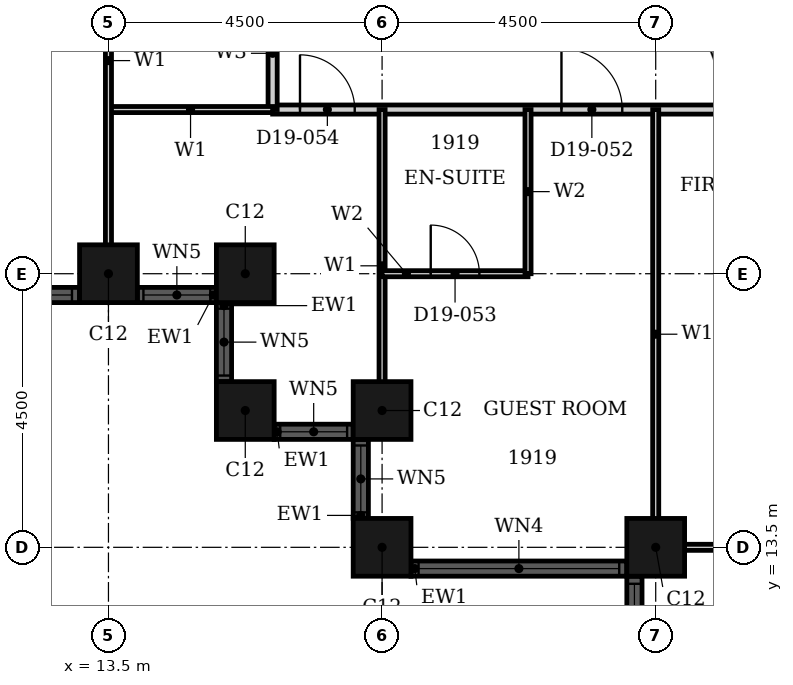
"""IFC4 building model, lengths in metres.
Left out: names, types, materials, properties, quantities, classifications, styles, units other than length and angle.
Written with IfcOpenShell. Run it as: python <this file> out.ifc"""

import sys

from ifc_helpers import new_model, si_unit, direction, frame, frame_2d, origin, origin_2d, place, context, subcontext, project, spatial, rectangle, hollow_rectangle, extrude, element, fill, save


model = new_model("IFC4")
c1 = context("Model", 3, precision=1e-05, world=origin(), true_north=direction((0.0, 1.0)))
c2 = subcontext(c1, "Body", "Model", "MODEL_VIEW")
j1 = project(units=[si_unit("LENGTHUNIT", "METRE"), si_unit("PLANEANGLEUNIT", "RADIAN")], contexts=[c1])
p1 = place(None, origin())
s1 = spatial("IfcSite", under=j1, at=p1, CompositionType="ELEMENT")
p2 = place(p1, origin())
s2 = spatial("IfcBuilding", under=s1, at=p2, CompositionType="ELEMENT")
p3 = place(p2, frame((0.0, 0.0, 81.6)))
s3 = spatial("IfcBuildingStorey", under=s2, at=p3, CompositionType="ELEMENT", Elevation=81.6)
for number, where, z_axis, x_axis in (
    (1, (13.5, 18.0, 0.0), (0.0, 0.0, 1.0), (1.0, 0.0, 0.0)),
    (2, (15.75, 18.0, 0.0), (0.0, 0.0, 1.0), (1.0, 0.0, 0.0)),
    (3, (15.75, 15.75, 0.0), (0.0, 0.0, 1.0), (1.0, 0.0, 0.0)),
    (4, (18.0, 15.75, 0.0), (0.0, 0.0, 1.0), (1.0, 0.0, 0.0)),
    (5, (18.0, 13.5, 0.0), (0.0, 0.0, 1.0), (1.0, 0.0, 0.0)),
    (6, (22.5, 13.5, 0.0), (0.0, 0.0, 1.0), (1.0, 0.0, 0.0)),
):
    element("IfcColumn", number, at=place(p3, frame(where, z_axis=z_axis, x_axis=x_axis)), inside=s3, PredefinedType="COLUMN", context=c2, shape_type="SweptSolid", body=[
        extrude(hollow_rectangle(XDim=0.95, YDim=0.95, WallThickness=0.03, at=origin_2d()), origin(), (0.0, 0.0, 1.0), 3.6),
    ])
p4 = place(p3, frame((4.975, 17.65, 0.0), z_axis=(0.0, 0.0, 1.0), x_axis=(1.0, 0.0, 0.0)))
e7 = element("IfcWall", 7, at=p4, inside=s3, PredefinedType="SOLIDWALL", context=c2, shape_type="SweptSolid", body=[
    extrude(rectangle(XDim=8.05, YDim=0.25, at=frame_2d((4.025, 0.0))), origin(), (0.0, 0.0, 1.0), 3.6),
])
p5 = place(p4, frame((0.125, 0.0, 0.9)))
e8 = element("IfcOpeningElement", 8, at=p5, cuts=e7, PredefinedType="OPENING", context=c2, shape_type="SweptSolid", body=[
    extrude(rectangle(XDim=3.3, YDim=2.08, at=frame_2d((1.65, 1.04))), frame((0.0, 0.135, 0.0), z_axis=(0.0, -1.0, 0.0), x_axis=(1.0, 0.0, 0.0)), (0.0, 0.0, 1.0), 0.27),
])
p6 = place(p4, frame((4.625, 0.0, 0.9)))
e9 = element("IfcOpeningElement", 9, at=p6, cuts=e7, PredefinedType="OPENING", context=c2, shape_type="SweptSolid", body=[
    extrude(rectangle(XDim=3.3, YDim=2.08, at=frame_2d((1.65, 1.04))), frame((0.0, 0.135, 0.0), z_axis=(0.0, -1.0, 0.0), x_axis=(1.0, 0.0, 0.0)), (0.0, 0.0, 1.0), 0.27),
])
p7 = place(p3, frame((13.975, 17.65, 0.0), z_axis=(0.0, 0.0, 1.0), x_axis=(1.0, 0.0, 0.0)))
e10 = element("IfcWall", 10, at=p7, inside=s3, PredefinedType="SOLIDWALL", context=c2, shape_type="SweptSolid", body=[
    extrude(rectangle(XDim=1.3, YDim=0.25, at=frame_2d((0.65, 0.0))), origin(), (0.0, 0.0, 1.0), 3.6),
])
p8 = place(p7, frame((0.1, 0.0, 0.9)))
e11 = element("IfcOpeningElement", 11, at=p8, cuts=e10, PredefinedType="OPENING", context=c2, shape_type="SweptSolid", body=[
    extrude(rectangle(XDim=1.1, YDim=2.08, at=frame_2d((0.55, 1.04))), frame((0.0, 0.135, 0.0), z_axis=(0.0, -1.0, 0.0), x_axis=(1.0, 0.0, 0.0)), (0.0, 0.0, 1.0), 0.27),
])
p9 = place(p3, frame((15.4, 17.525, 0.0), z_axis=(0.0, 0.0, 1.0), x_axis=(0.0, -1.0, 0.0)))
e12 = element("IfcWall", 12, at=p9, inside=s3, PredefinedType="SOLIDWALL", context=c2, shape_type="SweptSolid", body=[
    extrude(rectangle(XDim=1.3, YDim=0.25, at=frame_2d((0.65, 0.0))), origin(), (0.0, 0.0, 1.0), 3.6),
])
p10 = place(p9, frame((0.1, 0.0, 0.9)))
e13 = element("IfcOpeningElement", 13, at=p10, cuts=e12, PredefinedType="OPENING", context=c2, shape_type="SweptSolid", body=[
    extrude(rectangle(XDim=1.1, YDim=2.08, at=frame_2d((0.55, 1.04))), frame((0.0, 0.135, 0.0), z_axis=(0.0, -1.0, 0.0), x_axis=(1.0, 0.0, 0.0)), (0.0, 0.0, 1.0), 0.27),
])
p11 = place(p3, frame((16.225, 15.4, 0.0), z_axis=(0.0, 0.0, 1.0), x_axis=(1.0, 0.0, 0.0)))
e14 = element("IfcWall", 14, at=p11, inside=s3, PredefinedType="SOLIDWALL", context=c2, shape_type="SweptSolid", body=[
    extrude(rectangle(XDim=1.3, YDim=0.25, at=frame_2d((0.65, 0.0))), origin(), (0.0, 0.0, 1.0), 3.6),
])
p12 = place(p11, frame((0.1, 0.0, 0.9)))
e15 = element("IfcOpeningElement", 15, at=p12, cuts=e14, PredefinedType="OPENING", context=c2, shape_type="SweptSolid", body=[
    extrude(rectangle(XDim=1.1, YDim=2.08, at=frame_2d((0.55, 1.04))), frame((0.0, 0.135, 0.0), z_axis=(0.0, -1.0, 0.0), x_axis=(1.0, 0.0, 0.0)), (0.0, 0.0, 1.0), 0.27),
])
p13 = place(p3, frame((17.65, 15.275, 0.0), z_axis=(0.0, 0.0, 1.0), x_axis=(0.0, -1.0, 0.0)))
e16 = element("IfcWall", 16, at=p13, inside=s3, PredefinedType="SOLIDWALL", context=c2, shape_type="SweptSolid", body=[
    extrude(rectangle(XDim=1.3, YDim=0.25, at=frame_2d((0.65, 0.0))), origin(), (0.0, 0.0, 1.0), 3.6),
])
p14 = place(p13, frame((0.1, 0.0, 0.9)))
e17 = element("IfcOpeningElement", 17, at=p14, cuts=e16, PredefinedType="OPENING", context=c2, shape_type="SweptSolid", body=[
    extrude(rectangle(XDim=1.1, YDim=2.08, at=frame_2d((0.55, 1.04))), frame((0.0, 0.135, 0.0), z_axis=(0.0, -1.0, 0.0), x_axis=(1.0, 0.0, 0.0)), (0.0, 0.0, 1.0), 0.27),
])
p15 = place(p3, frame((18.475, 13.15, 0.0), z_axis=(0.0, 0.0, 1.0), x_axis=(1.0, 0.0, 0.0)))
e18 = element("IfcWall", 18, at=p15, inside=s3, PredefinedType="SOLIDWALL", context=c2, shape_type="SweptSolid", body=[
    extrude(rectangle(XDim=3.55, YDim=0.25, at=frame_2d((1.775, 0.0))), origin(), (0.0, 0.0, 1.0), 3.6),
])
p16 = place(p15, frame((0.125, 0.0, 0.9)))
e19 = element("IfcOpeningElement", 19, at=p16, cuts=e18, PredefinedType="OPENING", context=c2, shape_type="SweptSolid", body=[
    extrude(rectangle(XDim=3.3, YDim=2.08, at=frame_2d((1.65, 1.04))), frame((0.0, 0.135, 0.0), z_axis=(0.0, -1.0, 0.0), x_axis=(1.0, 0.0, 0.0)), (0.0, 0.0, 1.0), 0.27),
])
p17 = place(p3, frame((22.15, 13.025, 0.0), z_axis=(0.0, 0.0, 1.0), x_axis=(0.0, -1.0, 0.0)))
e20 = element("IfcWall", 20, at=p17, inside=s3, PredefinedType="SOLIDWALL", context=c2, shape_type="SweptSolid", body=[
    extrude(rectangle(XDim=8.05, YDim=0.25, at=frame_2d((4.025, 0.0))), origin(), (0.0, 0.0, 1.0), 3.6),
])
p18 = place(p17, frame((0.125, 0.0, 0.9)))
e21 = element("IfcOpeningElement", 21, at=p18, cuts=e20, PredefinedType="OPENING", context=c2, shape_type="SweptSolid", body=[
    extrude(rectangle(XDim=3.3, YDim=2.08, at=frame_2d((1.65, 1.04))), frame((0.0, 0.135, 0.0), z_axis=(0.0, -1.0, 0.0), x_axis=(1.0, 0.0, 0.0)), (0.0, 0.0, 1.0), 0.27),
])
p19 = place(p17, frame((4.625, 0.0, 0.9)))
e22 = element("IfcOpeningElement", 22, at=p19, cuts=e20, PredefinedType="OPENING", context=c2, shape_type="SweptSolid", body=[
    extrude(rectangle(XDim=3.3, YDim=2.08, at=frame_2d((1.65, 1.04))), frame((0.0, 0.135, 0.0), z_axis=(0.0, -1.0, 0.0), x_axis=(1.0, 0.0, 0.0)), (0.0, 0.0, 1.0), 0.27),
])
p20 = place(p3, frame((16.2, 20.7, 0.0), z_axis=(0.0, 0.0, 1.0), x_axis=(1.0, 0.0, 0.0)))
e23 = element("IfcWall", 23, at=p20, inside=s3, PredefinedType="PARTITIONING", context=c2, shape_type="SweptSolid", body=[
    extrude(rectangle(XDim=13.5, YDim=0.15, at=frame_2d((6.75, 0.0))), origin(), (0.0, 0.0, 1.0), 3.3),
])
p21 = place(p20, frame((4.75, 0.0, 0.0)))
e24 = element("IfcOpeningElement", 24, at=p21, cuts=e23, PredefinedType="OPENING", context=c2, shape_type="SweptSolid", body=[
    extrude(rectangle(XDim=1.0, YDim=2.1, at=frame_2d((0.5, 1.05))), frame((0.0, 0.085, 0.0), z_axis=(0.0, -1.0, 0.0), x_axis=(1.0, 0.0, 0.0)), (0.0, 0.0, 1.0), 0.17),
])
p22 = place(p20, frame((0.45, 0.0, 0.0)))
e25 = element("IfcOpeningElement", 25, at=p22, cuts=e23, PredefinedType="OPENING", context=c2, shape_type="SweptSolid", body=[
    extrude(rectangle(XDim=0.9, YDim=2.1, at=frame_2d((0.45, 1.05))), frame((0.0, 0.085, 0.0), z_axis=(0.0, -1.0, 0.0), x_axis=(1.0, 0.0, 0.0)), (0.0, 0.0, 1.0), 0.17),
])
p23 = place(p20, frame((9.45, 0.0, 0.0)))
e26 = element("IfcOpeningElement", 26, at=p23, cuts=e23, PredefinedType="OPENING", context=c2, shape_type="SweptSolid", body=[
    extrude(rectangle(XDim=0.9, YDim=2.1, at=frame_2d((0.45, 1.05))), frame((0.0, 0.085, 0.0), z_axis=(0.0, -1.0, 0.0), x_axis=(1.0, 0.0, 0.0)), (0.0, 0.0, 1.0), 0.17),
])
p24 = place(p3, frame((16.2, 20.7, 0.0), z_axis=(0.0, 0.0, 1.0), x_axis=(0.0, 1.0, 0.0)))
e27 = element("IfcWall", 27, at=p24, inside=s3, PredefinedType="PARTITIONING", context=c2, shape_type="SweptSolid", body=[
    extrude(rectangle(XDim=4.5, YDim=0.15, at=frame_2d((2.25, 0.0))), origin(), (0.0, 0.0, 1.0), 3.3),
])
p25 = place(p24, frame((1.85, 0.0, 0.0)))
e28 = element("IfcOpeningElement", 28, at=p25, cuts=e27, PredefinedType="OPENING", context=c2, shape_type="SweptSolid", body=[
    extrude(rectangle(XDim=0.9, YDim=2.1, at=frame_2d((0.45, 1.05))), frame((0.0, 0.085, 0.0), z_axis=(0.0, -1.0, 0.0), x_axis=(1.0, 0.0, 0.0)), (0.0, 0.0, 1.0), 0.17),
])
p26 = place(p3, frame((22.31, 13.5, 0.0), z_axis=(0.0, 0.0, 1.0), x_axis=(1.0, 0.0, 0.0)))
e29 = element("IfcWall", 29, at=p26, inside=s3, PredefinedType="PARTITIONING", context=c2, shape_type="SweptSolid", body=[
    extrude(rectangle(XDim=7.39, YDim=0.1, at=frame_2d((3.695, 0.0))), origin(), (0.0, 0.0, 1.0), 2.38),
])
p27 = place(p3, frame((13.5, 20.7, 0.0), z_axis=(0.0, 0.0, 1.0), x_axis=(1.0, 0.0, 0.0)))
e30 = element("IfcWall", 30, at=p27, inside=s3, PredefinedType="PARTITIONING", context=c2, shape_type="SweptSolid", body=[
    extrude(rectangle(XDim=2.7, YDim=0.1, at=frame_2d((1.35, 0.0))), origin(), (0.0, 0.0, 1.0), 3.3),
])
p28 = place(p3, frame((13.5, 17.81, 0.0), z_axis=(0.0, 0.0, 1.0), x_axis=(0.0, 1.0, 0.0)))
e31 = element("IfcWall", 31, at=p28, inside=s3, PredefinedType="PARTITIONING", context=c2, shape_type="SweptSolid", body=[
    extrude(rectangle(XDim=7.39, YDim=0.1, at=frame_2d((3.695, 0.0))), origin(), (0.0, 0.0, 1.0), 2.38),
])
p29 = place(p3, frame((18.0, 15.56, 0.0), z_axis=(0.0, 0.0, 1.0), x_axis=(0.0, 1.0, 0.0)))
e32 = element("IfcWall", 32, at=p29, inside=s3, PredefinedType="PARTITIONING", context=c2, shape_type="SweptSolid", body=[
    extrude(rectangle(XDim=5.14, YDim=0.1, at=frame_2d((2.57, 0.0))), origin(), (0.0, 0.0, 1.0), 3.3),
])
p30 = place(p3, frame((22.5, 13.31, 0.0), z_axis=(0.0, 0.0, 1.0), x_axis=(0.0, 1.0, 0.0)))
e33 = element("IfcWall", 33, at=p30, inside=s3, PredefinedType="PARTITIONING", context=c2, shape_type="SweptSolid", body=[
    extrude(rectangle(XDim=7.39, YDim=0.1, at=frame_2d((3.695, 0.0))), origin(), (0.0, 0.0, 1.0), 3.3),
])
p31 = place(p3, frame((18.0, 18.0, 0.0), z_axis=(0.0, 0.0, 1.0), x_axis=(1.0, 0.0, 0.0)))
e34 = element("IfcWall", 34, at=p31, inside=s3, PredefinedType="PARTITIONING", context=c2, shape_type="SweptSolid", body=[
    extrude(rectangle(XDim=2.4, YDim=0.1, at=frame_2d((1.2, 0.0))), origin(), (0.0, 0.0, 1.0), 3.3),
])
p32 = place(p31, frame((0.8, 0.0, 0.0)))
e35 = element("IfcOpeningElement", 35, at=p32, cuts=e34, PredefinedType="OPENING", context=c2, shape_type="SweptSolid", body=[
    extrude(rectangle(XDim=0.8, YDim=2.1, at=frame_2d((0.4, 1.05))), frame((0.0, 0.06, 0.0), z_axis=(0.0, -1.0, 0.0), x_axis=(1.0, 0.0, 0.0)), (0.0, 0.0, 1.0), 0.12),
])
p33 = place(p3, frame((20.4, 18.0, 0.0), z_axis=(0.0, 0.0, 1.0), x_axis=(0.0, 1.0, 0.0)))
e36 = element("IfcWall", 36, at=p33, inside=s3, PredefinedType="PARTITIONING", context=c2, shape_type="SweptSolid", body=[
    extrude(rectangle(XDim=2.7, YDim=0.1, at=frame_2d((1.35, 0.0))), origin(), (0.0, 0.0, 1.0), 3.3),
])
p34 = place(p6, origin())
e37 = element("IfcWindow", 37, at=p34, inside=s3, PartitioningType="SINGLE_PANEL", PredefinedType="WINDOW", context=c2, shape_type="SweptSolid", body=[
    extrude(rectangle(XDim=3.3, YDim=2.08, at=frame_2d((1.65, 1.04))), frame((0.0, 0.03, 0.0), z_axis=(0.0, -1.0, 0.0), x_axis=(1.0, 0.0, 0.0)), (0.0, 0.0, 1.0), 0.06),
])
fill(e9, e37)
p35 = place(p8, origin())
e38 = element("IfcWindow", 38, at=p35, inside=s3, PartitioningType="SINGLE_PANEL", PredefinedType="WINDOW", context=c2, shape_type="SweptSolid", body=[
    extrude(rectangle(XDim=1.1, YDim=2.08, at=frame_2d((0.55, 1.04))), frame((0.0, 0.03, 0.0), z_axis=(0.0, -1.0, 0.0), x_axis=(1.0, 0.0, 0.0)), (0.0, 0.0, 1.0), 0.06),
])
fill(e11, e38)
p36 = place(p10, origin())
e39 = element("IfcWindow", 39, at=p36, inside=s3, PartitioningType="SINGLE_PANEL", PredefinedType="WINDOW", context=c2, shape_type="SweptSolid", body=[
    extrude(rectangle(XDim=1.1, YDim=2.08, at=frame_2d((0.55, 1.04))), frame((0.0, 0.03, 0.0), z_axis=(0.0, -1.0, 0.0), x_axis=(1.0, 0.0, 0.0)), (0.0, 0.0, 1.0), 0.06),
])
fill(e13, e39)
p37 = place(p12, origin())
e40 = element("IfcWindow", 40, at=p37, inside=s3, PartitioningType="SINGLE_PANEL", PredefinedType="WINDOW", context=c2, shape_type="SweptSolid", body=[
    extrude(rectangle(XDim=1.1, YDim=2.08, at=frame_2d((0.55, 1.04))), frame((0.0, 0.03, 0.0), z_axis=(0.0, -1.0, 0.0), x_axis=(1.0, 0.0, 0.0)), (0.0, 0.0, 1.0), 0.06),
])
fill(e15, e40)
p38 = place(p14, origin())
e41 = element("IfcWindow", 41, at=p38, inside=s3, PartitioningType="SINGLE_PANEL", PredefinedType="WINDOW", context=c2, shape_type="SweptSolid", body=[
    extrude(rectangle(XDim=1.1, YDim=2.08, at=frame_2d((0.55, 1.04))), frame((0.0, 0.03, 0.0), z_axis=(0.0, -1.0, 0.0), x_axis=(1.0, 0.0, 0.0)), (0.0, 0.0, 1.0), 0.06),
])
fill(e17, e41)
p39 = place(p16, origin())
e42 = element("IfcWindow", 42, at=p39, inside=s3, PartitioningType="SINGLE_PANEL", PredefinedType="WINDOW", context=c2, shape_type="SweptSolid", body=[
    extrude(rectangle(XDim=3.3, YDim=2.08, at=frame_2d((1.65, 1.04))), frame((0.0, 0.03, 0.0), z_axis=(0.0, -1.0, 0.0), x_axis=(1.0, 0.0, 0.0)), (0.0, 0.0, 1.0), 0.06),
])
fill(e19, e42)
p40 = place(p18, origin())
e43 = element("IfcWindow", 43, at=p40, inside=s3, PartitioningType="SINGLE_PANEL", PredefinedType="WINDOW", context=c2, shape_type="SweptSolid", body=[
    extrude(rectangle(XDim=3.3, YDim=2.08, at=frame_2d((1.65, 1.04))), frame((0.0, 0.03, 0.0), z_axis=(0.0, -1.0, 0.0), x_axis=(1.0, 0.0, 0.0)), (0.0, 0.0, 1.0), 0.06),
])
fill(e21, e43)
p41 = place(p21, origin())
e44 = element("IfcDoor", 44, at=p41, inside=s3, OperationType="SINGLE_SWING_RIGHT", PredefinedType="DOOR", context=c2, shape_type="SweptSolid", body=[
    extrude(rectangle(XDim=1.0, YDim=2.1, at=frame_2d((0.5, 1.05))), frame((0.0, 0.025, 0.0), z_axis=(0.0, -1.0, 0.0), x_axis=(1.0, 0.0, 0.0)), (0.0, 0.0, 1.0), 0.05),
])
fill(e24, e44)
p42 = place(p32, origin())
e45 = element("IfcDoor", 45, at=p42, inside=s3, OperationType="SINGLE_SWING_LEFT", PredefinedType="DOOR", context=c2, shape_type="SweptSolid", body=[
    extrude(rectangle(XDim=0.8, YDim=2.1, at=frame_2d((0.4, 1.05))), frame((0.0, 0.025, 0.0), z_axis=(0.0, -1.0, 0.0), x_axis=(1.0, 0.0, 0.0)), (0.0, 0.0, 1.0), 0.05),
])
fill(e35, e45)
p43 = place(p22, origin())
e46 = element("IfcDoor", 46, at=p43, inside=s3, OperationType="SINGLE_SWING_RIGHT", PredefinedType="DOOR", context=c2, shape_type="SweptSolid", body=[
    extrude(rectangle(XDim=0.9, YDim=2.1, at=frame_2d((0.45, 1.05))), frame((0.0, 0.025, 0.0), z_axis=(0.0, -1.0, 0.0), x_axis=(1.0, 0.0, 0.0)), (0.0, 0.0, 1.0), 0.05),
])
fill(e25, e46)
save(model, sys.argv[1])
